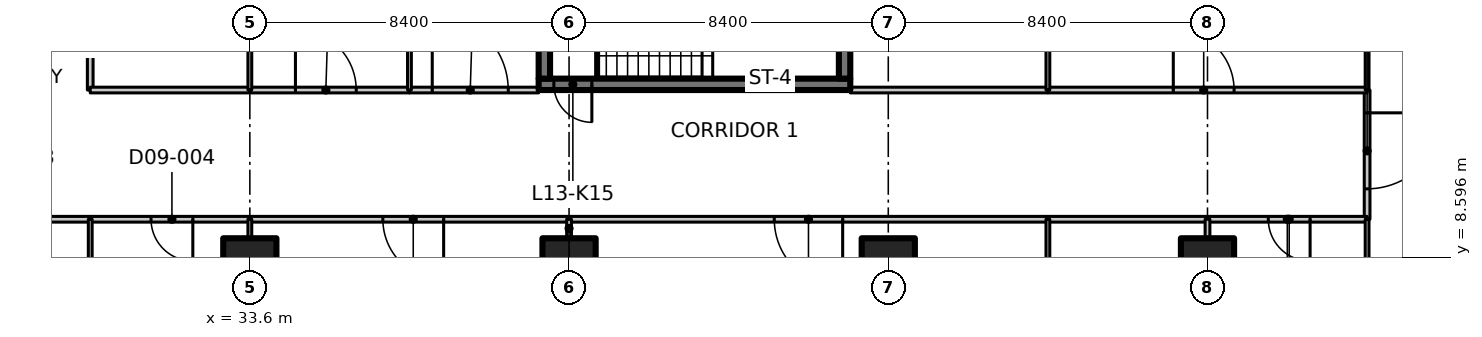
"""IFC4 building model, lengths in metres.
Left out: names, types, materials, properties, quantities, classifications, styles, units other than length and angle.
Written with IfcOpenShell. Run it as: python <this file> out.ifc"""

import sys

from ifc_helpers import new_model, si_unit, direction, frame, frame_2d, origin, origin_2d, place, context, subcontext, project, spatial, polyline, rectangle, outline, extrude, element, fill, save


model = new_model("IFC4")
c1 = context("Model", 3, precision=1e-05, world=origin(), true_north=direction((0.0, 1.0)))
c2 = subcontext(c1, "Body", "Model", "MODEL_VIEW")
j1 = project(units=[si_unit("LENGTHUNIT", "METRE"), si_unit("PLANEANGLEUNIT", "RADIAN")], contexts=[c1])
p1 = place(None, origin())
s1 = spatial("IfcSite", under=j1, at=p1, CompositionType="ELEMENT")
p2 = place(p1, origin())
s2 = spatial("IfcBuilding", under=s1, at=p2, CompositionType="ELEMENT")
p3 = place(p2, frame((0.0, 0.0, 61.7)))
s3 = spatial("IfcBuildingStorey", under=s2, at=p3, CompositionType="ELEMENT", Elevation=61.7)
for number, where, z_axis, x_axis in (
    (1, (33.6, 8.4, 0.0), (0.0, 0.0, 1.0), (1.0, 0.0, 0.0)),
    (2, (42.0, 8.4, 0.0), (0.0, 0.0, 1.0), (1.0, 0.0, 0.0)),
    (3, (50.4, 8.4, 0.0), (0.0, 0.0, 1.0), (1.0, 0.0, 0.0)),
    (4, (58.8, 8.4, 0.0), (0.0, 0.0, 1.0), (1.0, 0.0, 0.0)),
):
    element("IfcColumn", number, at=place(p3, frame(where, z_axis=z_axis, x_axis=x_axis)), inside=s3, PredefinedType="COLUMN", context=c2, shape_type="SweptSolid", body=[
        extrude(rectangle(XDim=1.4, YDim=1.4, at=origin_2d()), origin(), (0.0, 0.0, 1.0), 3.35),
    ])
p4 = place(p3, frame((49.4, 13.15, 0.0), z_axis=(0.0, 0.0, 1.0), x_axis=(-1.0, 0.0, 0.0)))
e5 = element("IfcWall", 5, at=p4, inside=s3, PredefinedType="SHEAR", context=c2, shape_type="SweptSolid", body=[
    extrude(rectangle(XDim=8.2, YDim=0.3, at=frame_2d((4.1, 0.0))), origin(), (0.0, 0.0, 1.0), 3.35),
])
p5 = place(p4, frame((6.8, 0.0, 0.0)))
e6 = element("IfcOpeningElement", 6, at=p5, cuts=e5, PredefinedType="OPENING", context=c2, shape_type="SweptSolid", body=[
    extrude(rectangle(XDim=1.0, YDim=2.1, at=frame_2d((0.5, 1.05))), frame((0.0, 0.16, 0.0), z_axis=(0.0, -1.0, 0.0), x_axis=(1.0, 0.0, 0.0)), (0.0, 0.0, 1.0), 0.32),
])
for number, where, z_axis, x_axis in (
    (7, (41.35, 13.3, 0.0), (0.0, 0.0, 1.0), (0.0, 1.0, 0.0)),
    (8, (49.25, 13.3, 0.0), (0.0, 0.0, 1.0), (0.0, 1.0, 0.0)),
):
    element("IfcWall", number, at=place(p3, frame(where, z_axis=z_axis, x_axis=x_axis)), inside=s3, PredefinedType="SHEAR", context=c2, shape_type="SweptSolid", body=[
        extrude(rectangle(XDim=2.55, YDim=0.3, at=frame_2d((1.275, 0.0))), origin(), (0.0, 0.0, 1.0), 3.35),
    ])
p6 = place(p3, frame((29.4, 9.6, 0.0), z_axis=(0.0, 0.0, 1.0), x_axis=(-1.0, 0.0, 0.0)))
e9 = element("IfcWall", 9, at=p6, inside=s3, PredefinedType="PARTITIONING", context=c2, shape_type="SweptSolid", body=[
    extrude(rectangle(XDim=4.2, YDim=0.15, at=frame_2d((2.1, 0.0))), origin(), (0.0, 0.0, 1.0), 3.33),
])
p7 = place(p6, frame((1.5, 0.0, 0.0)))
e10 = element("IfcOpeningElement", 10, at=p7, cuts=e9, PredefinedType="OPENING", context=c2, shape_type="SweptSolid", body=[
    extrude(rectangle(XDim=1.1, YDim=2.1, at=frame_2d((0.55, 1.05))), frame((0.0, 0.085, 0.0), z_axis=(0.0, -1.0, 0.0), x_axis=(1.0, 0.0, 0.0)), (0.0, 0.0, 1.0), 0.17),
])
p8 = place(p3, frame((29.4, 21.2, 0.0), z_axis=(0.0, 0.0, 1.0), x_axis=(0.0, -1.0, 0.0)))
e11 = element("IfcWall", 11, at=p8, inside=s3, PredefinedType="PARTITIONING", context=c2, shape_type="SweptSolid", body=[
    extrude(rectangle(XDim=8.2, YDim=0.15, at=frame_2d((4.1, 0.0))), origin(), (0.0, 0.0, 1.0), 3.33),
])
p9 = place(p8, frame((3.3, 0.0, 0.0)))
e12 = element("IfcOpeningElement", 12, at=p9, cuts=e11, PredefinedType="OPENING", context=c2, shape_type="SweptSolid", body=[
    extrude(rectangle(XDim=1.6, YDim=2.1, at=frame_2d((0.8, 1.05))), frame((0.0, 0.085, 0.0), z_axis=(0.0, -1.0, 0.0), x_axis=(1.0, 0.0, 0.0)), (0.0, 0.0, 1.0), 0.17),
])
p10 = place(p3, frame((63.0, 13.0, 0.0), z_axis=(0.0, 0.0, 1.0), x_axis=(0.0, -1.0, 0.0)))
e13 = element("IfcWall", 13, at=p10, inside=s3, PredefinedType="PARTITIONING", context=c2, shape_type="SweptSolid", body=[
    extrude(rectangle(XDim=3.4, YDim=0.15, at=frame_2d((1.7, 0.0))), origin(), (0.0, 0.0, 1.0), 3.33),
])
p11 = place(p10, frame((0.6, 0.0, 0.0)))
e14 = element("IfcOpeningElement", 14, at=p11, cuts=e13, PredefinedType="OPENING", context=c2, shape_type="SweptSolid", body=[
    extrude(rectangle(XDim=2.0, YDim=2.4, at=frame_2d((1.0, 1.2))), frame((0.0, 0.085, 0.0), z_axis=(0.0, -1.0, 0.0), x_axis=(1.0, 0.0, 0.0)), (0.0, 0.0, 1.0), 0.17),
])
p12 = place(p3, frame((33.6, 9.6, 0.0), z_axis=(0.0, 0.0, 1.0), x_axis=(-1.0, 0.0, 0.0)))
e15 = element("IfcWall", 15, at=p12, inside=s3, PredefinedType="PARTITIONING", context=c2, shape_type="SweptSolid", body=[
    extrude(rectangle(XDim=4.2, YDim=0.15, at=frame_2d((2.1, 0.0))), origin(), (0.0, 0.0, 1.0), 3.33),
])
p13 = place(p12, frame((1.5, 0.0, 0.0)))
e16 = element("IfcOpeningElement", 16, at=p13, cuts=e15, PredefinedType="OPENING", context=c2, shape_type="SweptSolid", body=[
    extrude(rectangle(XDim=1.1, YDim=2.1, at=frame_2d((0.55, 1.05))), frame((0.0, 0.085, 0.0), z_axis=(0.0, -1.0, 0.0), x_axis=(1.0, 0.0, 0.0)), (0.0, 0.0, 1.0), 0.17),
])
p14 = place(p3, frame((42.0, 9.6, 0.0), z_axis=(0.0, 0.0, 1.0), x_axis=(-1.0, 0.0, 0.0)))
e17 = element("IfcWall", 17, at=p14, inside=s3, PredefinedType="PARTITIONING", context=c2, shape_type="SweptSolid", body=[
    extrude(rectangle(XDim=8.4, YDim=0.15, at=frame_2d((4.2, 0.0))), origin(), (0.0, 0.0, 1.0), 3.33),
])
p15 = place(p14, frame((3.3, 0.0, 0.0)))
e18 = element("IfcOpeningElement", 18, at=p15, cuts=e17, PredefinedType="OPENING", context=c2, shape_type="SweptSolid", body=[
    extrude(rectangle(XDim=1.6, YDim=2.1, at=frame_2d((0.8, 1.05))), frame((0.0, 0.085, 0.0), z_axis=(0.0, -1.0, 0.0), x_axis=(1.0, 0.0, 0.0)), (0.0, 0.0, 1.0), 0.17),
])
p16 = place(p3, frame((54.6, 9.6, 0.0), z_axis=(0.0, 0.0, 1.0), x_axis=(-1.0, 0.0, 0.0)))
e19 = element("IfcWall", 19, at=p16, inside=s3, PredefinedType="PARTITIONING", context=c2, shape_type="SweptSolid", body=[
    extrude(rectangle(XDim=12.6, YDim=0.15, at=frame_2d((6.3, 0.0))), origin(), (0.0, 0.0, 1.0), 3.33),
])
p17 = place(p16, frame((5.4, 0.0, 0.0)))
e20 = element("IfcOpeningElement", 20, at=p17, cuts=e19, PredefinedType="OPENING", context=c2, shape_type="SweptSolid", body=[
    extrude(rectangle(XDim=1.8, YDim=2.1, at=frame_2d((0.9, 1.05))), frame((0.0, 0.085, 0.0), z_axis=(0.0, -1.0, 0.0), x_axis=(1.0, 0.0, 0.0)), (0.0, 0.0, 1.0), 0.17),
])
p18 = place(p3, frame((58.8, 9.6, 0.0), z_axis=(0.0, 0.0, 1.0), x_axis=(-1.0, 0.0, 0.0)))
e21 = element("IfcWall", 21, at=p18, inside=s3, PredefinedType="PARTITIONING", context=c2, shape_type="SweptSolid", body=[
    extrude(rectangle(XDim=4.2, YDim=0.15, at=frame_2d((2.1, 0.0))), origin(), (0.0, 0.0, 1.0), 3.33),
])
p19 = place(p3, frame((63.0, 9.6, 0.0), z_axis=(0.0, 0.0, 1.0), x_axis=(-1.0, 0.0, 0.0)))
e22 = element("IfcWall", 22, at=p19, inside=s3, PredefinedType="PARTITIONING", context=c2, shape_type="SweptSolid", body=[
    extrude(rectangle(XDim=4.2, YDim=0.15, at=frame_2d((2.1, 0.0))), origin(), (0.0, 0.0, 1.0), 3.33),
])
p20 = place(p19, frame((1.5, 0.0, 0.0)))
e23 = element("IfcOpeningElement", 23, at=p20, cuts=e22, PredefinedType="OPENING", context=c2, shape_type="SweptSolid", body=[
    extrude(rectangle(XDim=1.1, YDim=2.1, at=frame_2d((0.55, 1.05))), frame((0.0, 0.085, 0.0), z_axis=(0.0, -1.0, 0.0), x_axis=(1.0, 0.0, 0.0)), (0.0, 0.0, 1.0), 0.17),
])
p21 = place(p3, frame((29.4, 13.0, 0.0), z_axis=(0.0, 0.0, 1.0), x_axis=(1.0, 0.0, 0.0)))
e24 = element("IfcWall", 24, at=p21, inside=s3, PredefinedType="PARTITIONING", context=c2, shape_type="SweptSolid", body=[
    extrude(rectangle(XDim=4.2, YDim=0.15, at=frame_2d((2.1, 0.0))), origin(), (0.0, 0.0, 1.0), 3.33),
])
p22 = place(p3, frame((33.6, 13.0, 0.0), z_axis=(0.0, 0.0, 1.0), x_axis=(1.0, 0.0, 0.0)))
e25 = element("IfcWall", 25, at=p22, inside=s3, PredefinedType="PARTITIONING", context=c2, shape_type="SweptSolid", body=[
    extrude(rectangle(XDim=4.2, YDim=0.15, at=frame_2d((2.1, 0.0))), origin(), (0.0, 0.0, 1.0), 3.33),
])
p23 = place(p22, frame((1.2, 0.0, 0.0)))
e26 = element("IfcOpeningElement", 26, at=p23, cuts=e25, PredefinedType="OPENING", context=c2, shape_type="SweptSolid", body=[
    extrude(rectangle(XDim=1.6, YDim=2.1, at=frame_2d((0.8, 1.05))), frame((0.0, 0.085, 0.0), z_axis=(0.0, -1.0, 0.0), x_axis=(1.0, 0.0, 0.0)), (0.0, 0.0, 1.0), 0.17),
])
p24 = place(p3, frame((37.8, 13.0, 0.0), z_axis=(0.0, 0.0, 1.0), x_axis=(1.0, 0.0, 0.0)))
e27 = element("IfcWall", 27, at=p24, inside=s3, PredefinedType="PARTITIONING", context=c2, shape_type="SweptSolid", body=[
    extrude(rectangle(XDim=3.4, YDim=0.15, at=frame_2d((1.7, 0.0))), origin(), (0.0, 0.0, 1.0), 3.33),
])
p25 = place(p24, frame((0.6, 0.0, 0.0)))
e28 = element("IfcOpeningElement", 28, at=p25, cuts=e27, PredefinedType="OPENING", context=c2, shape_type="SweptSolid", body=[
    extrude(rectangle(XDim=2.0, YDim=2.4, at=frame_2d((1.0, 1.2))), frame((0.0, 0.085, 0.0), z_axis=(0.0, -1.0, 0.0), x_axis=(1.0, 0.0, 0.0)), (0.0, 0.0, 1.0), 0.17),
])
p26 = place(p3, frame((49.4, 13.0, 0.0), z_axis=(0.0, 0.0, 1.0), x_axis=(1.0, 0.0, 0.0)))
e29 = element("IfcWall", 29, at=p26, inside=s3, PredefinedType="PARTITIONING", context=c2, shape_type="SweptSolid", body=[
    extrude(rectangle(XDim=5.2, YDim=0.15, at=frame_2d((2.6, 0.0))), origin(), (0.0, 0.0, 1.0), 3.33),
])
p27 = place(p3, frame((54.6, 13.0, 0.0), z_axis=(0.0, 0.0, 1.0), x_axis=(1.0, 0.0, 0.0)))
e30 = element("IfcWall", 30, at=p27, inside=s3, PredefinedType="PARTITIONING", context=c2, shape_type="SweptSolid", body=[
    extrude(rectangle(XDim=8.4, YDim=0.15, at=frame_2d((4.2, 0.0))), origin(), (0.0, 0.0, 1.0), 3.33),
])
p28 = place(p27, frame((3.3, 0.0, 0.0)))
e31 = element("IfcOpeningElement", 31, at=p28, cuts=e30, PredefinedType="OPENING", context=c2, shape_type="SweptSolid", body=[
    extrude(rectangle(XDim=1.6, YDim=2.1, at=frame_2d((0.8, 1.05))), frame((0.0, 0.085, 0.0), z_axis=(0.0, -1.0, 0.0), x_axis=(1.0, 0.0, 0.0)), (0.0, 0.0, 1.0), 0.17),
])
p29 = place(p3, frame((63.0, -0.2, 0.0), z_axis=(0.0, 0.0, 1.0), x_axis=(0.0, 1.0, 0.0)))
e32 = element("IfcWall", 32, at=p29, inside=s3, PredefinedType="PARTITIONING", context=c2, shape_type="SweptSolid", body=[
    extrude(outline(polyline([(0.0, 0.0), (9.8, 0.0), (9.8, 3.33), (5.066, 3.33), (5.064, 2.98), (3.736, 2.98), (3.734, 3.33), (0.0, 3.33), (0.0, 0.0)])), frame((0.0, 0.05, 0.0), z_axis=(0.0, -1.0, 0.0), x_axis=(1.0, 0.0, 0.0)), (0.0, 0.0, 1.0), 0.1),
])
p30 = place(p3, frame((63.0, 13.0, 0.0), z_axis=(0.0, 0.0, 1.0), x_axis=(0.0, 1.0, 0.0)))
e33 = element("IfcWall", 33, at=p30, inside=s3, PredefinedType="PARTITIONING", context=c2, shape_type="SweptSolid", body=[
    extrude(outline(polyline([(0.0, 0.0), (12.4, 0.0), (12.4, 3.33), (8.666, 3.33), (8.664, 2.98), (7.336, 2.98), (7.334, 3.33), (0.0, 3.33), (0.0, 0.0)])), frame((0.0, 0.05, 0.0), z_axis=(0.0, -1.0, 0.0), x_axis=(1.0, 0.0, 0.0)), (0.0, 0.0, 1.0), 0.1),
])
p31 = place(p3, frame((29.4, 9.6, 0.0), z_axis=(0.0, 0.0, 1.0), x_axis=(0.0, -1.0, 0.0)))
e34 = element("IfcWall", 34, at=p31, inside=s3, PredefinedType="PARTITIONING", context=c2, shape_type="SweptSolid", body=[
    extrude(outline(polyline([(0.0, 0.0), (10.774, 0.0), (10.774, 3.33), (10.7, 3.33), (10.05, 3.33), (10.048, 2.98), (9.152, 2.98), (9.15, 3.33), (0.0, 3.33), (0.0, 0.0)])), frame((0.0, 0.05, 0.0), z_axis=(0.0, -1.0, 0.0), x_axis=(1.0, 0.0, 0.0)), (0.0, 0.0, 1.0), 0.1),
])
p32 = place(p3, frame((33.6, 9.6, 0.0), z_axis=(0.0, 0.0, 1.0), x_axis=(0.0, -1.0, 0.0)))
e35 = element("IfcWall", 35, at=p32, inside=s3, PredefinedType="PARTITIONING", context=c2, shape_type="SweptSolid", body=[
    extrude(rectangle(XDim=0.48, YDim=0.1, at=frame_2d((0.24, 0.0))), origin(), (0.0, 0.0, 1.0), 3.33),
])
p33 = place(p3, frame((42.0, 9.6, 0.0), z_axis=(0.0, 0.0, 1.0), x_axis=(0.0, -1.0, 0.0)))
e36 = element("IfcWall", 36, at=p33, inside=s3, PredefinedType="PARTITIONING", context=c2, shape_type="SweptSolid", body=[
    extrude(rectangle(XDim=0.48, YDim=0.125, at=frame_2d((0.24, 0.0))), origin(), (0.0, 0.0, 1.0), 3.33),
])
p34 = place(p3, frame((54.6, 9.6, 0.0), z_axis=(0.0, 0.0, 1.0), x_axis=(0.0, -1.0, 0.0)))
e37 = element("IfcWall", 37, at=p34, inside=s3, PredefinedType="PARTITIONING", context=c2, shape_type="SweptSolid", body=[
    extrude(rectangle(XDim=4.2, YDim=0.1, at=frame_2d((2.1, 0.0))), origin(), (0.0, 0.0, 1.0), 3.33),
])
p35 = place(p3, frame((58.8, 9.6, 0.0), z_axis=(0.0, 0.0, 1.0), x_axis=(0.0, -1.0, 0.0)))
e38 = element("IfcWall", 38, at=p35, inside=s3, PredefinedType="PARTITIONING", context=c2, shape_type="SweptSolid", body=[
    extrude(rectangle(XDim=0.48, YDim=0.125, at=frame_2d((0.24, 0.0))), origin(), (0.0, 0.0, 1.0), 3.33),
])
p36 = place(p3, frame((33.6, 16.08, 0.0), z_axis=(0.0, 0.0, 1.0), x_axis=(0.0, -1.0, 0.0)))
e39 = element("IfcWall", 39, at=p36, inside=s3, PredefinedType="PARTITIONING", context=c2, shape_type="SweptSolid", body=[
    extrude(rectangle(XDim=3.08, YDim=0.1, at=frame_2d((1.54, 0.0))), origin(), (0.0, 0.0, 1.0), 3.33),
])
p37 = place(p3, frame((37.8, 30.526, 0.0), z_axis=(0.0, 0.0, 1.0), x_axis=(0.0, -1.0, 0.0)))
e40 = element("IfcWall", 40, at=p37, inside=s3, PredefinedType="PARTITIONING", context=c2, shape_type="SweptSolid", body=[
    extrude(outline(polyline([(0.0, 0.0), (17.526, 0.0), (17.526, 3.33), (5.776, 3.33), (5.774, 2.98), (4.878, 2.98), (4.876, 3.33), (0.283, 3.33), (0.0, 3.33), (0.0, 0.0)])), frame((0.0, 0.05, 0.0), z_axis=(0.0, -1.0, 0.0), x_axis=(1.0, 0.0, 0.0)), (0.0, 0.0, 1.0), 0.1),
])
p38 = place(p3, frame((54.6, 26.565, 0.0), z_axis=(0.0, 0.0, 1.0), x_axis=(0.0, -1.0, 0.0)))
e41 = element("IfcWall", 41, at=p38, inside=s3, PredefinedType="PARTITIONING", context=c2, shape_type="SweptSolid", body=[
    extrude(outline(polyline([(0.0, 0.0), (13.565, 0.0), (13.565, 3.33), (1.815, 3.33), (1.813, 2.98), (0.917, 2.98), (0.915, 3.33), (0.265, 3.33), (0.0, 3.33), (0.0, 0.0)])), frame((0.0, 0.05, 0.0), z_axis=(0.0, -1.0, 0.0), x_axis=(1.0, 0.0, 0.0)), (0.0, 0.0, 1.0), 0.1),
])
p39 = place(p5, origin())
e42 = element("IfcDoor", 42, at=p39, inside=s3, OperationType="SINGLE_SWING_RIGHT", PredefinedType="DOOR", context=c2, shape_type="SweptSolid", body=[
    extrude(rectangle(XDim=1.0, YDim=2.1, at=frame_2d((0.5, 1.05))), frame((0.0, 0.025, 0.0), z_axis=(0.0, -1.0, 0.0), x_axis=(1.0, 0.0, 0.0)), (0.0, 0.0, 1.0), 0.05),
])
fill(e6, e42)
p40 = place(p11, origin())
e43 = element("IfcDoor", 43, at=p40, inside=s3, OperationType="DOUBLE_DOOR_SINGLE_SWING", PredefinedType="DOOR", context=c2, shape_type="SweptSolid", body=[
    extrude(rectangle(XDim=2.0, YDim=2.4, at=frame_2d((1.0, 1.2))), frame((0.0, 0.025, 0.0), z_axis=(0.0, -1.0, 0.0), x_axis=(1.0, 0.0, 0.0)), (0.0, 0.0, 1.0), 0.05),
])
fill(e14, e43)
p41 = place(p13, origin())
e44 = element("IfcDoor", 44, at=p41, inside=s3, OperationType="SINGLE_SWING_LEFT", PredefinedType="DOOR", context=c2, shape_type="SweptSolid", body=[
    extrude(rectangle(XDim=1.1, YDim=2.1, at=frame_2d((0.55, 1.05))), frame((0.0, 0.025, 0.0), z_axis=(0.0, -1.0, 0.0), x_axis=(1.0, 0.0, 0.0)), (0.0, 0.0, 1.0), 0.05),
])
fill(e16, e44)
p42 = place(p15, origin())
e45 = element("IfcDoor", 45, at=p42, inside=s3, OperationType="DOUBLE_DOOR_SINGLE_SWING", PredefinedType="DOOR", context=c2, shape_type="SweptSolid", body=[
    extrude(rectangle(XDim=1.6, YDim=2.1, at=frame_2d((0.8, 1.05))), frame((0.0, 0.025, 0.0), z_axis=(0.0, -1.0, 0.0), x_axis=(1.0, 0.0, 0.0)), (0.0, 0.0, 1.0), 0.05),
])
fill(e18, e45)
p43 = place(p17, origin())
e46 = element("IfcDoor", 46, at=p43, inside=s3, OperationType="DOUBLE_DOOR_SINGLE_SWING", PredefinedType="DOOR", context=c2, shape_type="SweptSolid", body=[
    extrude(rectangle(XDim=1.8, YDim=2.1, at=frame_2d((0.9, 1.05))), frame((0.0, 0.025, 0.0), z_axis=(0.0, -1.0, 0.0), x_axis=(1.0, 0.0, 0.0)), (0.0, 0.0, 1.0), 0.05),
])
fill(e20, e46)
p44 = place(p20, origin())
e47 = element("IfcDoor", 47, at=p44, inside=s3, OperationType="SINGLE_SWING_LEFT", PredefinedType="DOOR", context=c2, shape_type="SweptSolid", body=[
    extrude(rectangle(XDim=1.1, YDim=2.1, at=frame_2d((0.55, 1.05))), frame((0.0, 0.025, 0.0), z_axis=(0.0, -1.0, 0.0), x_axis=(1.0, 0.0, 0.0)), (0.0, 0.0, 1.0), 0.05),
])
fill(e23, e47)
p45 = place(p23, origin())
e48 = element("IfcDoor", 48, at=p45, inside=s3, OperationType="DOUBLE_DOOR_SINGLE_SWING", PredefinedType="DOOR", context=c2, shape_type="SweptSolid", body=[
    extrude(rectangle(XDim=1.6, YDim=2.1, at=frame_2d((0.8, 1.05))), frame((0.0, 0.025, 0.0), z_axis=(0.0, -1.0, 0.0), x_axis=(1.0, 0.0, 0.0)), (0.0, 0.0, 1.0), 0.05),
])
fill(e26, e48)
p46 = place(p25, origin())
e49 = element("IfcDoor", 49, at=p46, inside=s3, OperationType="DOUBLE_DOOR_SINGLE_SWING", PredefinedType="DOOR", context=c2, shape_type="SweptSolid", body=[
    extrude(rectangle(XDim=2.0, YDim=2.4, at=frame_2d((1.0, 1.2))), frame((0.0, 0.025, 0.0), z_axis=(0.0, -1.0, 0.0), x_axis=(1.0, 0.0, 0.0)), (0.0, 0.0, 1.0), 0.05),
])
fill(e28, e49)
p47 = place(p28, origin())
e50 = element("IfcDoor", 50, at=p47, inside=s3, OperationType="DOUBLE_DOOR_SINGLE_SWING", PredefinedType="DOOR", context=c2, shape_type="SweptSolid", body=[
    extrude(rectangle(XDim=1.6, YDim=2.1, at=frame_2d((0.8, 1.05))), frame((0.0, 0.025, 0.0), z_axis=(0.0, -1.0, 0.0), x_axis=(1.0, 0.0, 0.0)), (0.0, 0.0, 1.0), 0.05),
])
fill(e31, e50)
save(model, sys.argv[1])
